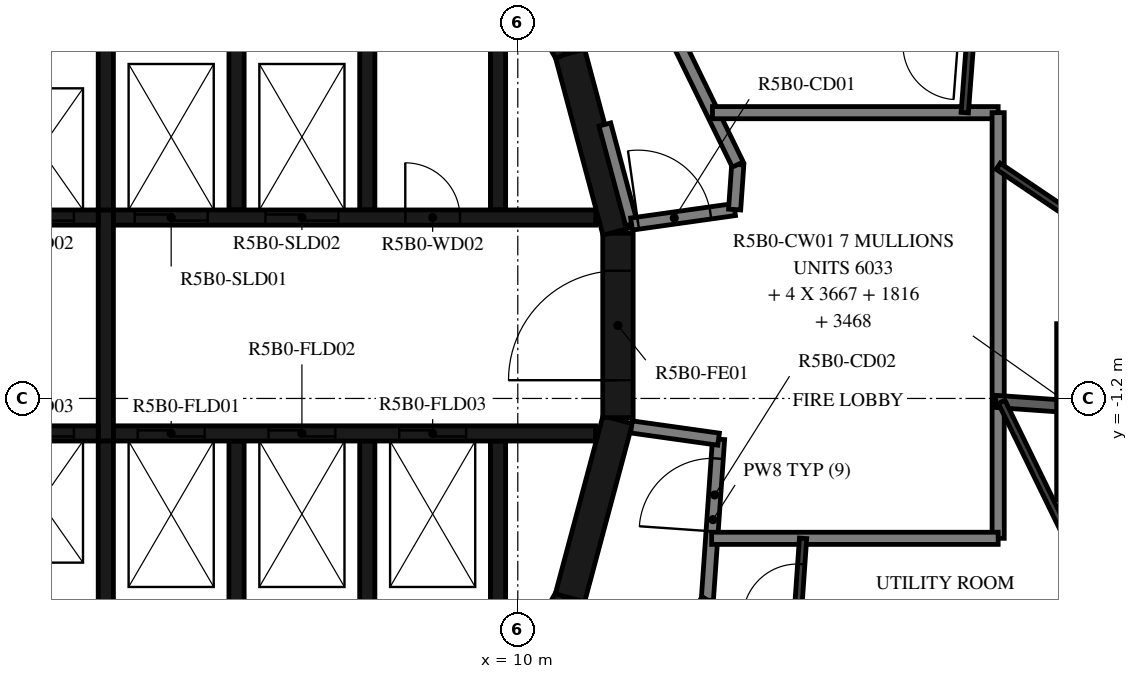
"""IFC4 building model, lengths in metres.
Left out: names, types, materials, properties, quantities, classifications, styles, units other than length and angle.
Written with IfcOpenShell. Run it as: python <this file> out.ifc"""

import sys

from ifc_helpers import new_model, si_unit, direction, frame, frame_2d, origin, place, context, subcontext, project, spatial, polyline, rectangle, outline, extrude, element, fill, save


model = new_model("IFC4")
c1 = context("Model", 3, precision=1e-05, world=origin(), true_north=direction((0.0, 1.0)))
c2 = subcontext(c1, "Body", "Model", "MODEL_VIEW")
j1 = project(units=[si_unit("LENGTHUNIT", "METRE"), si_unit("PLANEANGLEUNIT", "RADIAN")], contexts=[c1])
p1 = place(None, origin())
s1 = spatial("IfcSite", under=j1, at=p1, CompositionType="ELEMENT")
p2 = place(p1, origin())
s2 = spatial("IfcBuilding", under=s1, at=p2, CompositionType="ELEMENT")
p3 = place(p2, frame((0.0, 0.0, 202.4)))
s3 = spatial("IfcBuildingStorey", under=s2, at=p3, CompositionType="ELEMENT", Elevation=202.4)
for number, where, z_axis, x_axis in (
    (1, (9.329, -7.137, 0.0), (0.0, 0.0, 1.0), (0.5, 0.866, 0.0)),
    (2, (10.858, -4.479, 0.0), (0.0, 0.0, 1.0), (0.259, 0.966, 0.0)),
):
    element("IfcWall", number, at=place(p3, frame(where, z_axis=z_axis, x_axis=x_axis)), inside=s3, PredefinedType="SHEAR", context=c2, shape_type="SweptSolid", body=[
        extrude(rectangle(XDim=3.033, YDim=0.5, at=frame_2d((1.516, 0.0))), origin(), (0.0, 0.0, 1.0), 3.12),
    ])
p4 = place(p3, frame((11.647, -1.516, 0.0), z_axis=(0.0, 0.0, 1.0), x_axis=(0.0, 1.0, 0.0)))
e3 = element("IfcWall", 3, at=p4, inside=s3, PredefinedType="SHEAR", context=c2, shape_type="SweptSolid", body=[
    extrude(rectangle(XDim=3.033, YDim=0.5, at=frame_2d((1.516, 0.0))), origin(), (0.0, 0.0, 1.0), 3.12),
])
p5 = place(p4, frame((0.616, 0.0, 0.0)))
e4 = element("IfcOpeningElement", 4, at=p5, cuts=e3, PredefinedType="OPENING", context=c2, shape_type="SweptSolid", body=[
    extrude(rectangle(XDim=1.8, YDim=2.1, at=frame_2d((0.9, 1.05))), frame((0.0, 0.26, 0.0), z_axis=(0.0, -1.0, 0.0), x_axis=(1.0, 0.0, 0.0)), (0.0, 0.0, 1.0), 0.52),
])
for number, where, z_axis, x_axis in (
    (5, (11.643, 1.55, 0.0), (0.0, 0.0, 1.0), (-0.259, 0.966, 0.0)),
    (6, (10.845, 4.51, 0.0), (0.0, 0.0, 1.0), (-0.5, 0.866, 0.0)),
):
    element("IfcWall", number, at=place(p3, frame(where, z_axis=z_axis, x_axis=x_axis)), inside=s3, PredefinedType="SHEAR", context=c2, shape_type="SweptSolid", body=[
        extrude(rectangle(XDim=3.033, YDim=0.5, at=frame_2d((1.516, 0.0))), origin(), (0.0, 0.0, 1.0), 3.12),
    ])
p6 = place(p3, origin())
e7 = element("IfcWall", 7, at=p6, inside=s3, PredefinedType="SHEAR", context=c2, shape_type="SweptSolid", body=[
    extrude(outline(polyline([(-9.55, 4.8), (-1.2, 4.8), (-1.2, 1.9), (-0.95, 1.9), (-0.95, 4.8), (0.95, 4.8), (0.95, 1.9), (1.2, 1.9), (1.2, 4.8), (3.1, 4.8), (3.1, 1.9), (3.35, 1.9), (3.35, 4.8), (5.25, 4.8), (5.25, 1.9), (5.5, 1.9), (5.5, 4.8), (7.4, 4.8), (7.4, 1.9), (7.65, 1.9), (7.65, 4.8), (9.55, 4.8), (9.55, 1.9), (9.8, 1.9), (9.8, 4.8), (9.8, 5.05), (-9.8, 5.05), (-9.8, 4.8), (-9.8, 1.9), (-9.55, 1.9), (-9.55, 4.8)])), origin(), (0.0, 0.0, 1.0), 3.12),
])
p7 = place(p3, origin())
e8 = element("IfcWall", 8, at=p7, inside=s3, PredefinedType="SHEAR", context=c2, shape_type="SweptSolid", body=[
    extrude(outline(polyline([(9.8, -5.05), (9.8, -4.8), (9.8, -1.9), (9.55, -1.9), (9.55, -4.8), (7.65, -4.8), (7.65, -1.9), (7.4, -1.9), (7.4, -4.8), (5.5, -4.8), (5.5, -1.9), (5.25, -1.9), (5.25, -4.8), (3.35, -4.8), (3.35, -1.9), (3.1, -1.9), (3.1, -4.8), (1.2, -4.8), (1.2, -1.9), (0.95, -1.9), (0.95, -4.8), (-0.95, -4.8), (-0.95, -1.9), (-1.2, -1.9), (-1.2, -4.8), (-3.1, -4.8), (-3.1, -1.9), (-3.35, -1.9), (-3.35, -4.8), (-5.25, -4.8), (-5.25, -1.9), (-5.5, -1.9), (-5.5, -4.8), (-7.4, -4.8), (-7.4, -1.9), (-7.65, -1.9), (-7.65, -4.8), (-9.55, -4.8), (-9.55, -1.9), (-9.8, -1.9), (-9.8, -4.8), (-9.8, -5.05), (9.8, -5.05)])), origin(), (0.0, 0.0, 1.0), 3.12),
])
p8 = place(p3, frame((-11.28, 1.775, 0.0), z_axis=(0.0, 0.0, 1.0), x_axis=(1.0, 0.0, 0.0)))
e9 = element("IfcWall", 9, at=p8, inside=s3, PredefinedType="SHEAR", context=c2, shape_type="SweptSolid", body=[
    extrude(rectangle(XDim=14.38, YDim=0.25, at=frame_2d((7.19, 0.0))), origin(), (0.0, 0.0, 1.0), 3.12),
])
p9 = place(p8, frame((10.73, 0.0, 0.0)))
e10 = element("IfcOpeningElement", 10, at=p9, cuts=e9, PredefinedType="OPENING", context=c2, shape_type="SweptSolid", body=[
    extrude(rectangle(XDim=1.1, YDim=2.1, at=frame_2d((0.55, 1.05))), frame((0.0, 0.135, 0.0), z_axis=(0.0, -1.0, 0.0), x_axis=(1.0, 0.0, 0.0)), (0.0, 0.0, 1.0), 0.27),
])
p10 = place(p8, frame((12.88, 0.0, 0.0)))
e11 = element("IfcOpeningElement", 11, at=p10, cuts=e9, PredefinedType="OPENING", context=c2, shape_type="SweptSolid", body=[
    extrude(rectangle(XDim=1.1, YDim=2.1, at=frame_2d((0.55, 1.05))), frame((0.0, 0.135, 0.0), z_axis=(0.0, -1.0, 0.0), x_axis=(1.0, 0.0, 0.0)), (0.0, 0.0, 1.0), 0.27),
])
p11 = place(p8, frame((5.455, 0.0, 0.0)))
e12 = element("IfcOpeningElement", 12, at=p11, cuts=e9, PredefinedType="OPENING", context=c2, shape_type="SweptSolid", body=[
    extrude(rectangle(XDim=0.9, YDim=2.1, at=frame_2d((0.45, 1.05))), frame((0.0, 0.135, 0.0), z_axis=(0.0, -1.0, 0.0), x_axis=(1.0, 0.0, 0.0)), (0.0, 0.0, 1.0), 0.27),
])
p12 = place(p3, frame((3.35, 1.775, 0.0), z_axis=(0.0, 0.0, 1.0), x_axis=(1.0, 0.0, 0.0)))
e13 = element("IfcWall", 13, at=p12, inside=s3, PredefinedType="SHEAR", context=c2, shape_type="SweptSolid", body=[
    extrude(rectangle(XDim=7.93, YDim=0.25, at=frame_2d((3.965, 0.0))), origin(), (0.0, 0.0, 1.0), 3.12),
])
p13 = place(p12, frame((0.35, 0.0, 0.0)))
e14 = element("IfcOpeningElement", 14, at=p13, cuts=e13, PredefinedType="OPENING", context=c2, shape_type="SweptSolid", body=[
    extrude(rectangle(XDim=1.2, YDim=2.4, at=frame_2d((0.6, 1.2))), frame((0.0, 0.135, 0.0), z_axis=(0.0, -1.0, 0.0), x_axis=(1.0, 0.0, 0.0)), (0.0, 0.0, 1.0), 0.27),
])
p14 = place(p12, frame((2.5, 0.0, 0.0)))
e15 = element("IfcOpeningElement", 15, at=p14, cuts=e13, PredefinedType="OPENING", context=c2, shape_type="SweptSolid", body=[
    extrude(rectangle(XDim=1.2, YDim=2.4, at=frame_2d((0.6, 1.2))), frame((0.0, 0.135, 0.0), z_axis=(0.0, -1.0, 0.0), x_axis=(1.0, 0.0, 0.0)), (0.0, 0.0, 1.0), 0.27),
])
p15 = place(p12, frame((4.8, 0.0, 0.0)))
e16 = element("IfcOpeningElement", 16, at=p15, cuts=e13, PredefinedType="OPENING", context=c2, shape_type="SweptSolid", body=[
    extrude(rectangle(XDim=0.9, YDim=2.1, at=frame_2d((0.45, 1.05))), frame((0.0, 0.135, 0.0), z_axis=(0.0, -1.0, 0.0), x_axis=(1.0, 0.0, 0.0)), (0.0, 0.0, 1.0), 0.27),
])
p16 = place(p3, frame((-11.28, -1.775, 0.0), z_axis=(0.0, 0.0, 1.0), x_axis=(1.0, 0.0, 0.0)))
e17 = element("IfcWall", 17, at=p16, inside=s3, PredefinedType="SHEAR", context=c2, shape_type="SweptSolid", body=[
    extrude(rectangle(XDim=14.38, YDim=0.25, at=frame_2d((7.19, 0.0))), origin(), (0.0, 0.0, 1.0), 3.12),
])
p17 = place(p16, frame((12.88, 0.0, 0.0)))
e18 = element("IfcOpeningElement", 18, at=p17, cuts=e17, PredefinedType="OPENING", context=c2, shape_type="SweptSolid", body=[
    extrude(rectangle(XDim=1.1, YDim=2.1, at=frame_2d((0.55, 1.05))), frame((0.0, 0.135, 0.0), z_axis=(0.0, -1.0, 0.0), x_axis=(1.0, 0.0, 0.0)), (0.0, 0.0, 1.0), 0.27),
])
p18 = place(p16, frame((6.53, 0.0, 0.0)))
e19 = element("IfcOpeningElement", 19, at=p18, cuts=e17, PredefinedType="OPENING", context=c2, shape_type="SweptSolid", body=[
    extrude(rectangle(XDim=0.9, YDim=2.1, at=frame_2d((0.45, 1.05))), frame((0.0, 0.135, 0.0), z_axis=(0.0, -1.0, 0.0), x_axis=(1.0, 0.0, 0.0)), (0.0, 0.0, 1.0), 0.27),
])
p19 = place(p16, frame((8.68, 0.0, 0.0)))
e20 = element("IfcOpeningElement", 20, at=p19, cuts=e17, PredefinedType="OPENING", context=c2, shape_type="SweptSolid", body=[
    extrude(rectangle(XDim=0.9, YDim=2.1, at=frame_2d((0.45, 1.05))), frame((0.0, 0.135, 0.0), z_axis=(0.0, -1.0, 0.0), x_axis=(1.0, 0.0, 0.0)), (0.0, 0.0, 1.0), 0.27),
])
p20 = place(p16, frame((10.83, 0.0, 0.0)))
e21 = element("IfcOpeningElement", 21, at=p20, cuts=e17, PredefinedType="OPENING", context=c2, shape_type="SweptSolid", body=[
    extrude(rectangle(XDim=0.9, YDim=2.1, at=frame_2d((0.45, 1.05))), frame((0.0, 0.135, 0.0), z_axis=(0.0, -1.0, 0.0), x_axis=(1.0, 0.0, 0.0)), (0.0, 0.0, 1.0), 0.27),
])
p21 = place(p3, frame((3.35, -1.775, 0.0), z_axis=(0.0, 0.0, 1.0), x_axis=(1.0, 0.0, 0.0)))
e22 = element("IfcWall", 22, at=p21, inside=s3, PredefinedType="SHEAR", context=c2, shape_type="SweptSolid", body=[
    extrude(rectangle(XDim=7.93, YDim=0.25, at=frame_2d((3.965, 0.0))), origin(), (0.0, 0.0, 1.0), 3.12),
])
p22 = place(p21, frame((0.4, 0.0, 0.0)))
e23 = element("IfcOpeningElement", 23, at=p22, cuts=e22, PredefinedType="OPENING", context=c2, shape_type="SweptSolid", body=[
    extrude(rectangle(XDim=1.1, YDim=2.4, at=frame_2d((0.55, 1.2))), frame((0.0, 0.135, 0.0), z_axis=(0.0, -1.0, 0.0), x_axis=(1.0, 0.0, 0.0)), (0.0, 0.0, 1.0), 0.27),
])
p23 = place(p21, frame((2.55, 0.0, 0.0)))
e24 = element("IfcOpeningElement", 24, at=p23, cuts=e22, PredefinedType="OPENING", context=c2, shape_type="SweptSolid", body=[
    extrude(rectangle(XDim=1.1, YDim=2.4, at=frame_2d((0.55, 1.2))), frame((0.0, 0.135, 0.0), z_axis=(0.0, -1.0, 0.0), x_axis=(1.0, 0.0, 0.0)), (0.0, 0.0, 1.0), 0.27),
])
p24 = place(p21, frame((4.7, 0.0, 0.0)))
e25 = element("IfcOpeningElement", 25, at=p24, cuts=e22, PredefinedType="OPENING", context=c2, shape_type="SweptSolid", body=[
    extrude(rectangle(XDim=1.1, YDim=2.4, at=frame_2d((0.55, 1.2))), frame((0.0, 0.135, 0.0), z_axis=(0.0, -1.0, 0.0), x_axis=(1.0, 0.0, 0.0)), (0.0, 0.0, 1.0), 0.27),
])
p25 = place(p3, frame((3.225, -1.9, 0.0), z_axis=(0.0, 0.0, 1.0), x_axis=(0.0, 1.0, 0.0)))
e26 = element("IfcWall", 26, at=p25, inside=s3, PredefinedType="SHEAR", context=c2, shape_type="SweptSolid", body=[
    extrude(rectangle(XDim=3.8, YDim=0.25, at=frame_2d((1.9, 0.0))), origin(), (0.0, 0.0, 1.0), 3.12),
])
p26 = place(p3, frame((11.87, 1.668, 0.0), z_axis=(0.0, 0.0, 1.0), x_axis=(-0.258836880648, 0.965921047093, 0.0)))
e27 = element("IfcWall", 27, at=p26, inside=s3, PredefinedType="STANDARD", context=c2, shape_type="SweptSolid", body=[
    extrude(rectangle(XDim=1.695, YDim=0.2, at=frame_2d((0.848, 0.0))), origin(), (0.0, 0.0, 1.0), 3.12),
])
p27 = place(p3, frame((11.87, 1.668, 0.0), z_axis=(0.0, 0.0, 1.0), x_axis=(0.990271931984, 0.139145609792, 0.0)))
e28 = element("IfcWall", 28, at=p27, inside=s3, PredefinedType="STANDARD", context=c2, shape_type="SweptSolid", body=[
    extrude(rectangle(XDim=1.712, YDim=0.2, at=frame_2d((0.856, 0.0))), origin(), (0.0, 0.0, 1.0), 3.12),
])
p28 = place(p27, frame((0.11, 0.0, 0.0)))
e29 = element("IfcOpeningElement", 29, at=p28, cuts=e28, PredefinedType="OPENING", context=c2, shape_type="SweptSolid", body=[
    extrude(rectangle(XDim=1.2, YDim=2.1, at=frame_2d((0.6, 1.05))), frame((0.0, 0.11, 0.0), z_axis=(0.0, -1.0, 0.0), x_axis=(1.0, 0.0, 0.0)), (0.0, 0.0, 1.0), 0.22),
])
p29 = place(p3, frame((13.566, 1.906, 0.0), z_axis=(0.0, 0.0, 1.0), x_axis=(0.07005495793, 0.997543133338, 0.0)))
e30 = element("IfcWall", 30, at=p29, inside=s3, PredefinedType="STANDARD", context=c2, shape_type="SweptSolid", body=[
    extrude(rectangle(XDim=0.742, YDim=0.2, at=frame_2d((0.371, 0.0))), origin(), (0.0, 0.0, 1.0), 3.12),
])
p30 = place(p3, frame((13.618, 2.647, 0.0), z_axis=(0.0, 0.0, 1.0), x_axis=(-0.438366026218, 0.898796543751, 0.0)))
e31 = element("IfcWall", 31, at=p30, inside=s3, PredefinedType="STANDARD", context=c2, shape_type="SweptSolid", body=[
    extrude(rectangle(XDim=7.181, YDim=0.2, at=frame_2d((3.591, 0.0))), origin(), (0.0, 0.0, 1.0), 3.12),
])
p31 = place(p3, frame((13.117, -4.517, 0.0), z_axis=(0.0, 0.0, 1.0), x_axis=(0.069736659613, 0.997565435601, 0.0)))
e32 = element("IfcWall", 32, at=p31, inside=s3, PredefinedType="STANDARD", context=c2, shape_type="SweptSolid", body=[
    extrude(rectangle(XDim=2.654, YDim=0.2, at=frame_2d((1.327, 0.0))), origin(), (0.0, 0.0, 1.0), 3.12),
])
p32 = place(p31, frame((1.134, 0.0, 0.0)))
e33 = element("IfcOpeningElement", 33, at=p32, cuts=e32, PredefinedType="OPENING", context=c2, shape_type="SweptSolid", body=[
    extrude(rectangle(XDim=1.2, YDim=2.1, at=frame_2d((0.6, 1.05))), frame((0.0, 0.11, 0.0), z_axis=(0.0, -1.0, 0.0), x_axis=(1.0, 0.0, 0.0)), (0.0, 0.0, 1.0), 0.22),
])
p33 = place(p3, frame((13.302, -1.869, 0.0), z_axis=(0.0, 0.0, 1.0), x_axis=(-0.990274397042, 0.13912806533, 0.0)))
e34 = element("IfcWall", 34, at=p33, inside=s3, PredefinedType="STANDARD", context=c2, shape_type="SweptSolid", body=[
    extrude(rectangle(XDim=1.446, YDim=0.2, at=frame_2d((0.723, 0.0))), origin(), (0.0, 0.0, 1.0), 3.12),
])
p34 = place(p3, frame((9.101, -10.47, 0.0), z_axis=(0.0, 0.0, 1.0), x_axis=(0.559195469534, 0.829035841718, 0.0)))
e35 = element("IfcWall", 35, at=p34, inside=s3, PredefinedType="STANDARD", context=c2, shape_type="SweptSolid", body=[
    extrude(rectangle(XDim=7.181, YDim=0.2, at=frame_2d((3.591, 0.0))), origin(), (0.0, 0.0, 1.0), 3.12),
])
p35 = place(p3, frame((17.9, 3.5, 0.0), z_axis=(0.0, 0.0, 1.0), x_axis=(-1.0, 0.0, 0.0)))
e36 = element("IfcWall", 36, at=p35, inside=s3, PredefinedType="STANDARD", context=c2, shape_type="SweptSolid", body=[
    extrude(rectangle(XDim=4.698, YDim=0.2, at=frame_2d((2.349, 0.0))), origin(), (0.0, 0.0, 1.0), 3.12),
])
p36 = place(p3, frame((17.9, -3.5, 0.0), z_axis=(0.0, 0.0, 1.0), x_axis=(0.0, 1.0, 0.0)))
e37 = element("IfcWall", 37, at=p36, inside=s3, PredefinedType="STANDARD", context=c2, shape_type="SweptSolid", body=[
    extrude(rectangle(XDim=7.0, YDim=0.2, at=frame_2d((3.5, 0.0))), origin(), (0.0, 0.0, 1.0), 3.12),
])
p37 = place(p3, frame((13.188, -3.5, 0.0), z_axis=(0.0, 0.0, 1.0), x_axis=(1.0, 0.0, 0.0)))
e38 = element("IfcWall", 38, at=p37, inside=s3, PredefinedType="STANDARD", context=c2, shape_type="SweptSolid", body=[
    extrude(rectangle(XDim=4.712, YDim=0.2, at=frame_2d((2.356, 0.0))), origin(), (0.0, 0.0, 1.0), 3.12),
])
p38 = place(p3, frame((17.857, -1.249, 0.0), z_axis=(0.0, 0.0, 1.0), x_axis=(0.997556932604, -0.069858186453, 0.0)))
e39 = element("IfcWall", 39, at=p38, inside=s3, PredefinedType="STANDARD", context=c2, shape_type="SweptSolid", body=[
    extrude(rectangle(XDim=1.087, YDim=0.2, at=frame_2d((0.543, 0.0))), origin(), (0.0, 0.0, 1.0), 3.12),
])
p39 = place(p3, frame((17.351, 3.5, 0.0), z_axis=(0.0, 0.0, 1.0), x_axis=(0.075374124137, 0.997155324616, 0.0)))
e40 = element("IfcWall", 40, at=p39, inside=s3, PredefinedType="PARTITIONING", context=c2, shape_type="SweptSolid", body=[
    extrude(rectangle(XDim=1.101, YDim=0.12, at=frame_2d((0.551, 0.0))), origin(), (0.0, 0.0, 1.0), 3.12),
])
p40 = place(p3, frame((21.141, 0.433, 0.0), z_axis=(0.0, 0.0, 1.0), x_axis=(-0.829049908454, 0.559174614313, 0.0)))
e41 = element("IfcWall", 41, at=p40, inside=s3, PredefinedType="PARTITIONING", context=c2, shape_type="SweptSolid", body=[
    extrude(rectangle(XDim=3.909, YDim=0.12, at=frame_2d((1.955, 0.0))), origin(), (0.0, 0.0, 1.0), 3.12),
])
p41 = place(p40, frame((0.8, 0.0, 0.0)))
e42 = element("IfcOpeningElement", 42, at=p41, cuts=e41, PredefinedType="OPENING", context=c2, shape_type="SweptSolid", body=[
    extrude(rectangle(XDim=0.8, YDim=2.1, at=frame_2d((0.4, 1.05))), frame((0.0, 0.07, 0.0), z_axis=(0.0, -1.0, 0.0), x_axis=(1.0, 0.0, 0.0)), (0.0, 0.0, 1.0), 0.14),
])
p42 = place(p3, frame((14.585, -5.022, 0.0), z_axis=(0.0, 0.0, 1.0), x_axis=(0.069757481187, 0.997563979812, 0.0)))
e43 = element("IfcWall", 43, at=p42, inside=s3, PredefinedType="PARTITIONING", context=c2, shape_type="SweptSolid", body=[
    extrude(rectangle(XDim=1.526, YDim=0.12, at=frame_2d((0.763, 0.0))), origin(), (0.0, 0.0, 1.0), 3.12),
])
p43 = place(p42, frame((0.2, 0.0, 0.0)))
e44 = element("IfcOpeningElement", 44, at=p43, cuts=e43, PredefinedType="OPENING", context=c2, shape_type="SweptSolid", body=[
    extrude(rectangle(XDim=0.9, YDim=2.1, at=frame_2d((0.45, 1.05))), frame((0.0, 0.07, 0.0), z_axis=(0.0, -1.0, 0.0), x_axis=(1.0, 0.0, 0.0)), (0.0, 0.0, 1.0), 0.14),
])
p44 = place(p3, frame((20.403, -6.271, 0.0), z_axis=(0.0, 0.0, 1.0), x_axis=(-0.438371913736, 0.898793672234, 0.0)))
e45 = element("IfcWall", 45, at=p44, inside=s3, PredefinedType="PARTITIONING", context=c2, shape_type="SweptSolid", body=[
    extrude(rectangle(XDim=5.58, YDim=0.12, at=frame_2d((2.79, 0.0))), origin(), (0.0, 0.0, 1.0), 3.12),
])
p45 = place(p44, frame((0.2, 0.0, 0.0)))
e46 = element("IfcOpeningElement", 46, at=p45, cuts=e45, PredefinedType="OPENING", context=c2, shape_type="SweptSolid", body=[
    extrude(rectangle(XDim=0.9, YDim=2.1, at=frame_2d((0.45, 1.05))), frame((0.0, 0.07, 0.0), z_axis=(0.0, -1.0, 0.0), x_axis=(1.0, 0.0, 0.0)), (0.0, 0.0, 1.0), 0.14),
])
p46 = place(p3, origin())
e47 = element("IfcWall", 47, at=p46, inside=s3, PredefinedType="STANDARD", context=c2, shape_type="SweptSolid", body=[
    extrude(outline(polyline([(21.762, 0.03), (21.762, -2.87), (18.862, -2.87), (18.862, 0.03), (21.762, 0.03)]), holes=[polyline([(19.062, -2.67), (21.562, -2.67), (21.562, -0.17), (19.062, -0.17), (19.062, -2.67)])]), origin(), (0.0, 0.0, 1.0), 3.12),
])
p47 = place(p5, origin())
e48 = element("IfcDoor", 48, at=p47, inside=s3, OperationType="DOUBLE_DOOR_SINGLE_SWING", PredefinedType="DOOR", context=c2, shape_type="SweptSolid", body=[
    extrude(rectangle(XDim=1.8, YDim=2.1, at=frame_2d((0.9, 1.05))), frame((0.0, 0.025, 0.0), z_axis=(0.0, -1.0, 0.0), x_axis=(1.0, 0.0, 0.0)), (0.0, 0.0, 1.0), 0.05),
])
fill(e4, e48)
p48 = place(p10, origin())
e49 = element("IfcDoor", 49, at=p48, inside=s3, OperationType="DOUBLE_DOOR_SLIDING", PredefinedType="DOOR", context=c2, shape_type="SweptSolid", body=[
    extrude(rectangle(XDim=1.1, YDim=2.1, at=frame_2d((0.55, 1.05))), frame((0.0, 0.025, 0.0), z_axis=(0.0, -1.0, 0.0), x_axis=(1.0, 0.0, 0.0)), (0.0, 0.0, 1.0), 0.05),
])
fill(e11, e49)
p49 = place(p13, origin())
e50 = element("IfcDoor", 50, at=p49, inside=s3, OperationType="DOUBLE_DOOR_SLIDING", PredefinedType="DOOR", context=c2, shape_type="SweptSolid", body=[
    extrude(rectangle(XDim=1.2, YDim=2.4, at=frame_2d((0.6, 1.2))), frame((0.0, 0.025, 0.0), z_axis=(0.0, -1.0, 0.0), x_axis=(1.0, 0.0, 0.0)), (0.0, 0.0, 1.0), 0.05),
])
fill(e14, e50)
p50 = place(p14, origin())
e51 = element("IfcDoor", 51, at=p50, inside=s3, OperationType="DOUBLE_DOOR_SLIDING", PredefinedType="DOOR", context=c2, shape_type="SweptSolid", body=[
    extrude(rectangle(XDim=1.2, YDim=2.4, at=frame_2d((0.6, 1.2))), frame((0.0, 0.025, 0.0), z_axis=(0.0, -1.0, 0.0), x_axis=(1.0, 0.0, 0.0)), (0.0, 0.0, 1.0), 0.05),
])
fill(e15, e51)
p51 = place(p17, origin())
e52 = element("IfcDoor", 52, at=p51, inside=s3, OperationType="DOUBLE_DOOR_SLIDING", PredefinedType="DOOR", context=c2, shape_type="SweptSolid", body=[
    extrude(rectangle(XDim=1.1, YDim=2.1, at=frame_2d((0.55, 1.05))), frame((0.0, 0.025, 0.0), z_axis=(0.0, -1.0, 0.0), x_axis=(1.0, 0.0, 0.0)), (0.0, 0.0, 1.0), 0.05),
])
fill(e18, e52)
p52 = place(p22, origin())
e53 = element("IfcDoor", 53, at=p52, inside=s3, OperationType="DOUBLE_DOOR_SLIDING", PredefinedType="DOOR", context=c2, shape_type="SweptSolid", body=[
    extrude(rectangle(XDim=1.1, YDim=2.4, at=frame_2d((0.55, 1.2))), frame((0.0, 0.025, 0.0), z_axis=(0.0, -1.0, 0.0), x_axis=(1.0, 0.0, 0.0)), (0.0, 0.0, 1.0), 0.05),
])
fill(e23, e53)
p53 = place(p23, origin())
e54 = element("IfcDoor", 54, at=p53, inside=s3, OperationType="DOUBLE_DOOR_SLIDING", PredefinedType="DOOR", context=c2, shape_type="SweptSolid", body=[
    extrude(rectangle(XDim=1.1, YDim=2.4, at=frame_2d((0.55, 1.2))), frame((0.0, 0.025, 0.0), z_axis=(0.0, -1.0, 0.0), x_axis=(1.0, 0.0, 0.0)), (0.0, 0.0, 1.0), 0.05),
])
fill(e24, e54)
p54 = place(p24, origin())
e55 = element("IfcDoor", 55, at=p54, inside=s3, OperationType="DOUBLE_DOOR_SLIDING", PredefinedType="DOOR", context=c2, shape_type="SweptSolid", body=[
    extrude(rectangle(XDim=1.1, YDim=2.4, at=frame_2d((0.55, 1.2))), frame((0.0, 0.025, 0.0), z_axis=(0.0, -1.0, 0.0), x_axis=(1.0, 0.0, 0.0)), (0.0, 0.0, 1.0), 0.05),
])
fill(e25, e55)
p55 = place(p15, origin())
e56 = element("IfcDoor", 56, at=p55, inside=s3, OperationType="SINGLE_SWING_RIGHT", PredefinedType="DOOR", context=c2, shape_type="SweptSolid", body=[
    extrude(rectangle(XDim=0.9, YDim=2.1, at=frame_2d((0.45, 1.05))), frame((0.0, 0.025, 0.0), z_axis=(0.0, -1.0, 0.0), x_axis=(1.0, 0.0, 0.0)), (0.0, 0.0, 1.0), 0.05),
])
fill(e16, e56)
p56 = place(p43, origin())
e57 = element("IfcDoor", 57, at=p56, inside=s3, OperationType="SINGLE_SWING_RIGHT", PredefinedType="DOOR", context=c2, shape_type="SweptSolid", body=[
    extrude(rectangle(XDim=0.9, YDim=2.1, at=frame_2d((0.45, 1.05))), frame((0.0, 0.025, 0.0), z_axis=(0.0, -1.0, 0.0), x_axis=(1.0, 0.0, 0.0)), (0.0, 0.0, 1.0), 0.05),
])
fill(e44, e57)
p57 = place(p28, origin())
e58 = element("IfcDoor", 58, at=p57, inside=s3, OperationType="DOUBLE_DOOR_SINGLE_SWING", PredefinedType="DOOR", context=c2, shape_type="SweptSolid", body=[
    extrude(rectangle(XDim=1.2, YDim=2.1, at=frame_2d((0.6, 1.05))), frame((0.0, 0.025, 0.0), z_axis=(0.0, -1.0, 0.0), x_axis=(1.0, 0.0, 0.0)), (0.0, 0.0, 1.0), 0.05),
])
fill(e29, e58)
p58 = place(p32, origin())
e59 = element("IfcDoor", 59, at=p58, inside=s3, OperationType="DOUBLE_DOOR_SINGLE_SWING", PredefinedType="DOOR", context=c2, shape_type="SweptSolid", body=[
    extrude(rectangle(XDim=1.2, YDim=2.1, at=frame_2d((0.6, 1.05))), frame((0.0, 0.025, 0.0), z_axis=(0.0, -1.0, 0.0), x_axis=(1.0, 0.0, 0.0)), (0.0, 0.0, 1.0), 0.05),
])
fill(e33, e59)
save(model, sys.argv[1])
